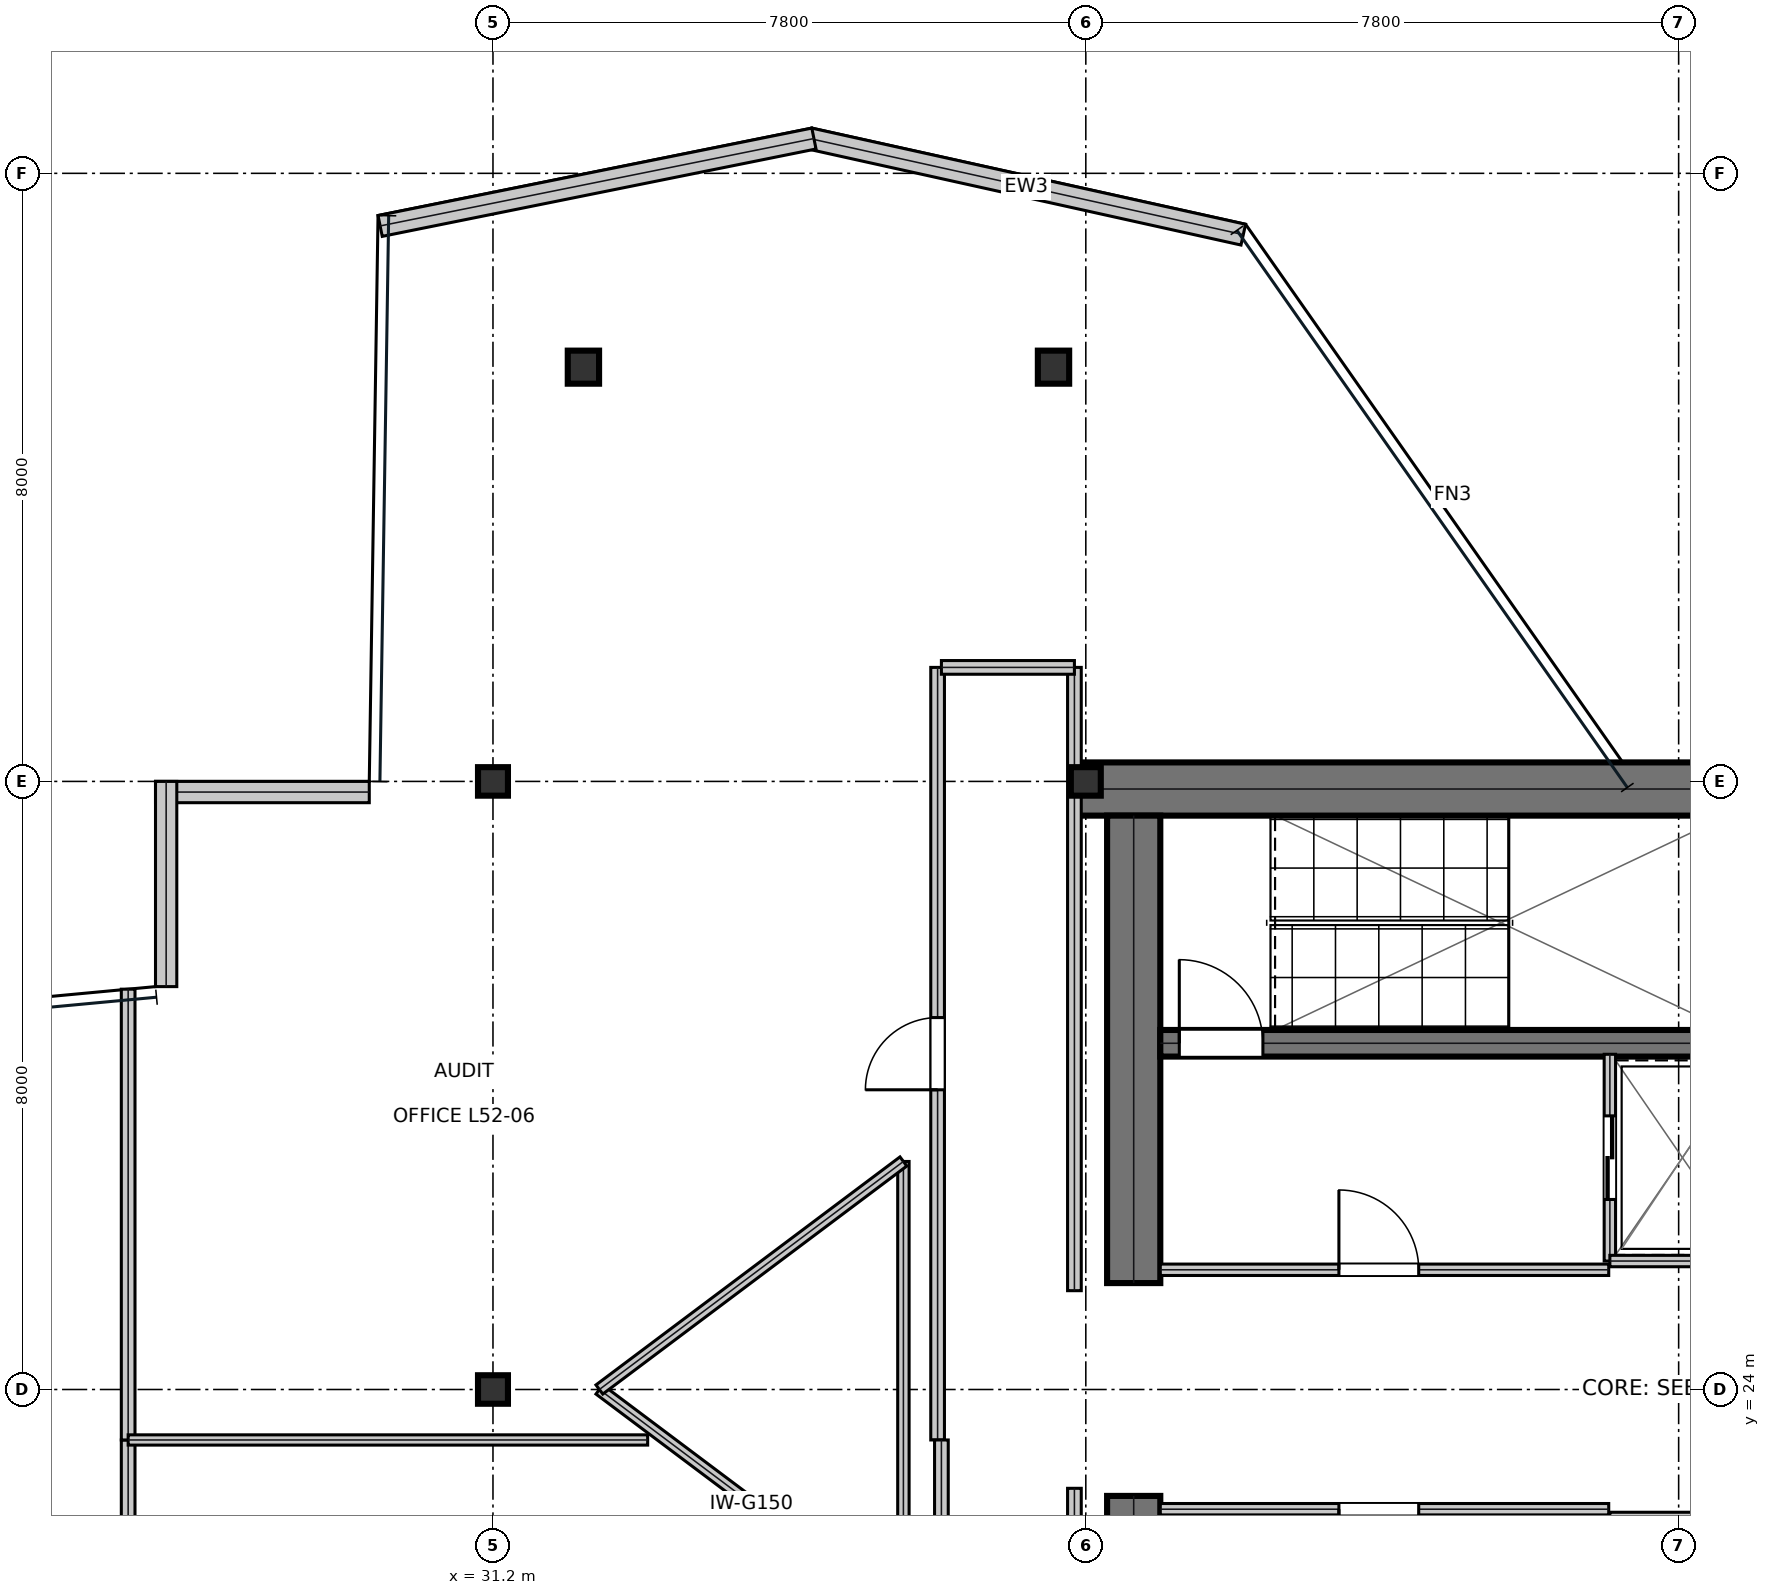
"""IFC4 building model, lengths in metres.
Left out: names, types, materials, properties, quantities, classifications, styles, units other than length and angle.
Written with IfcOpenShell. Run it as: python <this file> out.ifc"""

import sys

from ifc_helpers import new_model, si_unit, direction, frame, frame_2d, origin, origin_2d, place, context, subcontext, project, spatial, rectangle, i_section, extrude, element, fill, save


model = new_model("IFC4")
c1 = context("Model", 3, precision=1e-05, world=origin(), true_north=direction((0.0, 1.0)))
c2 = subcontext(c1, "Body", "Model", "MODEL_VIEW")
j1 = project(units=[si_unit("LENGTHUNIT", "METRE"), si_unit("PLANEANGLEUNIT", "RADIAN")], contexts=[c1])
p1 = place(None, origin())
s1 = spatial("IfcSite", under=j1, at=p1, CompositionType="ELEMENT")
p2 = place(p1, origin())
s2 = spatial("IfcBuilding", under=s1, at=p2, CompositionType="ELEMENT")
p3 = place(p2, frame((0.0, 0.0, 224.25)))
s3 = spatial("IfcBuildingStorey", under=s2, at=p3, CompositionType="ELEMENT", Elevation=224.25)
p4 = place(p3, frame((38.8, 31.9, 0.0), z_axis=(0.0, 0.0, 1.0), x_axis=(1.0, 0.0, 0.0)))
e1 = element("IfcWall", 1, at=p4, inside=s3, PredefinedType="SHEAR", context=c2, shape_type="SweptSolid", body=[
    extrude(rectangle(XDim=16.0, YDim=0.7, at=frame_2d((8.0, 0.0))), origin(), (0.0, 0.0, 1.0), 3.79),
])
for number, where, z_axis, x_axis in (
    (2, (39.63, 16.45, 0.0), (0.0, 0.0, 1.0), (0.0, 1.0, 0.0)),
    (3, (39.63, 25.4, 0.0), (0.0, 0.0, 1.0), (0.0, 1.0, 0.0)),
):
    element("IfcWall", number, at=place(p3, frame(where, z_axis=z_axis, x_axis=x_axis)), inside=s3, PredefinedType="SHEAR", context=c2, shape_type="SweptSolid", body=[
        extrude(rectangle(XDim=6.15, YDim=0.7, at=frame_2d((3.075, 0.0))), origin(), (0.0, 0.0, 1.0), 3.79),
    ])
p5 = place(p3, frame((39.98, 28.555, 0.0), z_axis=(0.0, 0.0, 1.0), x_axis=(1.0, 0.0, 0.0)))
e4 = element("IfcWall", 4, at=p5, inside=s3, PredefinedType="SHEAR", context=c2, shape_type="SweptSolid", body=[
    extrude(rectangle(XDim=7.71, YDim=0.35, at=frame_2d((3.855, 0.0))), origin(), (0.0, 0.0, 1.0), 3.79),
])
p6 = place(p5, frame((0.25, 0.0, 0.0)))
e5 = element("IfcOpeningElement", 5, at=p6, cuts=e4, PredefinedType="OPENING", context=c2, shape_type="SweptSolid", body=[
    extrude(rectangle(XDim=1.1, YDim=2.15, at=frame_2d((0.55, 1.075))), frame((0.0, 0.185, 0.0), z_axis=(0.0, -1.0, 0.0), x_axis=(1.0, 0.0, 0.0)), (0.0, 0.0, 1.0), 0.37),
])
for number, where, z_axis, x_axis in (
    (6, (31.2, 24.0, 0.0), (0.0, 0.0, 1.0), (1.0, 0.0, 0.0)),
    (7, (31.2, 32.0, 0.0), (0.0, 0.0, 1.0), (1.0, 0.0, 0.0)),
    (8, (39.0, 32.0, 0.0), (0.0, 0.0, 1.0), (1.0, 0.0, 0.0)),
):
    element("IfcColumn", number, at=place(p3, frame(where, z_axis=z_axis, x_axis=x_axis)), inside=s3, PredefinedType="COLUMN", context=c2, shape_type="SweptSolid", body=[
        extrude(i_section(OverallWidth=0.394, OverallDepth=0.375, WebThickness=0.017, FlangeThickness=0.028, at=origin_2d()), origin(), (0.0, 0.0, 1.0), 4.044),
    ])
p7 = place(p3, frame((32.39, 37.45, 0.016), z_axis=(0.013968236766, -0.029819148922, 0.999457706318), x_axis=(0.905569653976, 0.424197597586, 0.0)))
e9 = element("IfcColumn", 9, at=p7, inside=s3, PredefinedType="COLUMN", context=c2, shape_type="SweptSolid", body=[
    extrude(i_section(OverallWidth=0.412, OverallDepth=0.435, WebThickness=0.036, FlangeThickness=0.058, at=origin_2d()), origin(), (0.0, 0.0, 1.0), 4.02),
])
p8 = place(p3, frame((38.575, 37.45, 0.016), z_axis=(-0.004980404192, -0.029821688517, 0.99954282673), x_axis=(0.986339577116, -0.164724735893, 0.0)))
e10 = element("IfcColumn", 10, at=p8, inside=s3, PredefinedType="COLUMN", context=c2, shape_type="SweptSolid", body=[
    extrude(i_section(OverallWidth=0.412, OverallDepth=0.435, WebThickness=0.036, FlangeThickness=0.058, at=origin_2d()), origin(), (0.0, 0.0, 1.0), 4.02),
])
p9 = place(p3, frame((41.072, 39.193, 0.0), z_axis=(0.0, 0.0, 1.0), x_axis=(-0.976309738065, 0.216377668346, 0.0)))
e11 = element("IfcWall", 11, at=p9, inside=s3, PredefinedType="STANDARD", context=c2, shape_type="SweptSolid", body=[
    extrude(rectangle(XDim=5.846, YDim=0.28, at=frame_2d((2.923, 0.0))), origin(), (0.0, 0.0, 1.0), 3.79),
])
p10 = place(p3, frame((35.423, 40.458, 0.0), z_axis=(0.0, 0.0, 1.0), x_axis=(-0.98030065813, -0.197511062146, 0.0)))
e12 = element("IfcWall", 12, at=p10, inside=s3, PredefinedType="STANDARD", context=c2, shape_type="SweptSolid", body=[
    extrude(rectangle(XDim=5.822, YDim=0.28, at=frame_2d((2.911, 0.0))), origin(), (0.0, 0.0, 1.0), 3.79),
])
p11 = place(p3, frame((29.573, 31.86, 0.0), z_axis=(0.0, 0.0, 1.0), x_axis=(-1.0, 0.0, 0.0)))
e13 = element("IfcWall", 13, at=p11, inside=s3, PredefinedType="STANDARD", context=c2, shape_type="SweptSolid", body=[
    extrude(rectangle(XDim=2.812, YDim=0.28, at=frame_2d((1.406, 0.0))), origin(), (0.0, 0.0, 1.0), 3.79),
])
p12 = place(p3, frame((26.9, 32.0, 0.0), z_axis=(0.0, 0.0, 1.0), x_axis=(0.0, -1.0, 0.0)))
e14 = element("IfcWall", 14, at=p12, inside=s3, PredefinedType="STANDARD", context=c2, shape_type="SweptSolid", body=[
    extrude(rectangle(XDim=2.7, YDim=0.28, at=frame_2d((1.35, 0.0))), origin(), (0.0, 0.0, 1.0), 3.319),
])
p13 = place(p3, frame((39.98, 25.575, 0.0), z_axis=(0.0, 0.0, 1.0), x_axis=(1.0, 0.0, 0.0)))
e15 = element("IfcWall", 15, at=p13, inside=s3, PredefinedType="PARTITIONING", context=c2, shape_type="SweptSolid", body=[
    extrude(rectangle(XDim=5.9, YDim=0.15, at=frame_2d((2.95, 0.0))), origin(), (0.0, 0.0, 1.0), 3.79),
])
p14 = place(p13, frame((2.35, 0.0, 0.0)))
e16 = element("IfcOpeningElement", 16, at=p14, cuts=e15, PredefinedType="OPENING", context=c2, shape_type="SweptSolid", body=[
    extrude(rectangle(XDim=1.05, YDim=2.15, at=frame_2d((0.525, 1.075))), frame((0.0, 0.085, 0.0), z_axis=(0.0, -1.0, 0.0), x_axis=(1.0, 0.0, 0.0)), (0.0, 0.0, 1.0), 0.17),
])
p15 = place(p3, frame((39.98, 22.425, 0.0), z_axis=(0.0, 0.0, 1.0), x_axis=(1.0, 0.0, 0.0)))
e17 = element("IfcWall", 17, at=p15, inside=s3, PredefinedType="PARTITIONING", context=c2, shape_type="SweptSolid", body=[
    extrude(rectangle(XDim=5.9, YDim=0.15, at=frame_2d((2.95, 0.0))), origin(), (0.0, 0.0, 1.0), 3.79),
])
p16 = place(p15, frame((2.35, 0.0, 0.0)))
e18 = element("IfcOpeningElement", 18, at=p16, cuts=e17, PredefinedType="OPENING", context=c2, shape_type="SweptSolid", body=[
    extrude(rectangle(XDim=1.05, YDim=2.15, at=frame_2d((0.525, 1.075))), frame((0.0, 0.085, 0.0), z_axis=(0.0, -1.0, 0.0), x_axis=(1.0, 0.0, 0.0)), (0.0, 0.0, 1.0), 0.17),
])
p17 = place(p3, frame((45.895, 25.69, 0.0), z_axis=(0.0, 0.0, 1.0), x_axis=(0.0, 1.0, 0.0)))
e19 = element("IfcWall", 19, at=p17, inside=s3, PredefinedType="PARTITIONING", context=c2, shape_type="SweptSolid", body=[
    extrude(rectangle(XDim=2.72, YDim=0.15, at=frame_2d((1.36, 0.0))), origin(), (0.0, 0.0, 1.0), 3.79),
])
p18 = place(p17, frame((0.81, 0.0, 0.0)))
e20 = element("IfcOpeningElement", 20, at=p18, cuts=e19, PredefinedType="OPENING", context=c2, shape_type="SweptSolid", body=[
    extrude(rectangle(XDim=1.1, YDim=2.15, at=frame_2d((0.55, 1.075))), frame((0.0, 0.085, 0.0), z_axis=(0.0, -1.0, 0.0), x_axis=(1.0, 0.0, 0.0)), (0.0, 0.0, 1.0), 0.17),
])
for number, where, z_axis, x_axis in (
    (21, (45.895, 25.69, 0.0), (0.0, 0.0, 1.0), (1.0, 0.0, 0.0)),
    (22, (45.895, 22.31, 0.0), (0.0, 0.0, 1.0), (1.0, 0.0, 0.0)),
):
    element("IfcWall", number, at=place(p3, frame(where, z_axis=z_axis, x_axis=x_axis)), inside=s3, PredefinedType="PARTITIONING", context=c2, shape_type="SweptSolid", body=[
        extrude(rectangle(XDim=1.915, YDim=0.15, at=frame_2d((0.958, 0.0))), origin(), (0.0, 0.0, 1.0), 3.79),
    ])
p19 = place(p3, frame((37.05, 23.336, 0.0), z_axis=(0.0, 0.0, 1.0), x_axis=(0.0, 1.0, 0.0)))
e23 = element("IfcWall", 23, at=p19, inside=s3, PredefinedType="SOLIDWALL", context=c2, shape_type="SweptSolid", body=[
    extrude(rectangle(XDim=10.164, YDim=0.18, at=frame_2d((5.082, 0.0))), origin(), (0.0, 0.0, 1.0), 3.241),
])
p20 = place(p19, frame((4.607, 0.0, 0.0)))
e24 = element("IfcOpeningElement", 24, at=p20, cuts=e23, PredefinedType="OPENING", context=c2, shape_type="SweptSolid", body=[
    extrude(rectangle(XDim=0.95, YDim=2.15, at=frame_2d((0.475, 1.075))), frame((0.0, 0.1, 0.0), z_axis=(0.0, -1.0, 0.0), x_axis=(1.0, 0.0, 0.0)), (0.0, 0.0, 1.0), 0.2),
])
p21 = place(p3, frame((38.85, 14.707, 0.0), z_axis=(0.0, 0.0, 1.0), x_axis=(0.0, 1.0, 0.0)))
e25 = element("IfcWall", 25, at=p21, inside=s3, PredefinedType="SOLIDWALL", context=c2, shape_type="SweptSolid", body=[
    extrude(rectangle(XDim=7.993, YDim=0.18, at=frame_2d((3.997, 0.0))), origin(), (0.0, 0.0, 1.0), 3.241),
])
p22 = place(p3, frame((26.4, 20.6, 0.0), z_axis=(0.0, 0.0, 1.0), x_axis=(0.0, 1.0, 0.0)))
e26 = element("IfcWall", 26, at=p22, inside=s3, PredefinedType="SOLIDWALL", context=c2, shape_type="SweptSolid", body=[
    extrude(rectangle(XDim=2.736, YDim=0.18, at=frame_2d((1.368, 0.0))), origin(), (0.0, 0.0, 1.0), 3.241),
])
p23 = place(p3, frame((37.1, 20.6, 0.0), z_axis=(0.0, 0.0, 1.0), x_axis=(0.0, 1.0, 0.0)))
e27 = element("IfcWall", 27, at=p23, inside=s3, PredefinedType="SOLIDWALL", context=c2, shape_type="SweptSolid", body=[
    extrude(rectangle(XDim=2.736, YDim=0.18, at=frame_2d((1.368, 0.0))), origin(), (0.0, 0.0, 1.0), 3.79),
])
p24 = place(p3, frame((38.85, 25.3, 0.0), z_axis=(0.0, 0.0, 1.0), x_axis=(0.0, 1.0, 0.0)))
e28 = element("IfcWall", 28, at=p24, inside=s3, PredefinedType="SOLIDWALL", context=c2, shape_type="SweptSolid", body=[
    extrude(rectangle(XDim=8.2, YDim=0.18, at=frame_2d((4.1, 0.0))), origin(), (0.0, 0.0, 1.0), 3.241),
])
p25 = place(p3, frame((26.4, 23.336, 0.0), z_axis=(0.0, 0.0, 1.0), x_axis=(0.0, 1.0, 0.0)))
e29 = element("IfcWall", 29, at=p25, inside=s3, PredefinedType="SOLIDWALL", context=c2, shape_type="SweptSolid", body=[
    extrude(rectangle(XDim=5.931, YDim=0.18, at=frame_2d((2.965, 0.0))), origin(), (0.0, 0.0, 1.0), 3.241),
])
p26 = place(p3, frame((37.1, 33.5, 0.0), z_axis=(0.0, 0.0, 1.0), x_axis=(1.0, 0.0, 0.0)))
e30 = element("IfcWall", 30, at=p26, inside=s3, PredefinedType="SOLIDWALL", context=c2, shape_type="SweptSolid", body=[
    extrude(rectangle(XDim=1.75, YDim=0.18, at=frame_2d((0.875, 0.0))), origin(), (0.0, 0.0, 1.0), 3.241),
])
p27 = place(p3, frame((26.4, 23.336, 0.0), z_axis=(0.0, 0.0, 1.0), x_axis=(1.0, 0.0, 0.0)))
e31 = element("IfcWall", 31, at=p27, inside=s3, PredefinedType="PARTITIONING", context=c2, shape_type="SweptSolid", body=[
    extrude(rectangle(XDim=6.835, YDim=0.135, at=frame_2d((3.418, 0.0))), origin(), (0.0, 0.0, 1.0), 3.241),
])
p28 = place(p3, frame((32.6, 24.0, 0.0), z_axis=(0.0, 0.0, 1.0), x_axis=(0.8, -0.6, 0.0)))
e32 = element("IfcWall", 32, at=p28, inside=s3, PredefinedType="MOVABLE", context=c2, shape_type="SweptSolid", body=[
    extrude(rectangle(XDim=5.0, YDim=0.15, at=frame_2d((2.5, 0.0))), origin(), (0.0, 0.0, 1.0), 3.79),
])
p29 = place(p3, frame((36.6, 21.0, 0.0), z_axis=(0.0, 0.0, 1.0), x_axis=(0.0, 1.0, 0.0)))
e33 = element("IfcWall", 33, at=p29, inside=s3, PredefinedType="MOVABLE", context=c2, shape_type="SweptSolid", body=[
    extrude(rectangle(XDim=6.0, YDim=0.15, at=frame_2d((3.0, 0.0))), origin(), (0.0, 0.0, 1.0), 3.79),
])
p30 = place(p3, frame((36.6, 27.0, 0.0), z_axis=(0.0, 0.0, 1.0), x_axis=(-0.8, -0.6, 0.0)))
e34 = element("IfcWall", 34, at=p30, inside=s3, PredefinedType="MOVABLE", context=c2, shape_type="SweptSolid", body=[
    extrude(rectangle(XDim=5.0, YDim=0.15, at=frame_2d((2.5, 0.0))), origin(), (0.0, 0.0, 1.0), 3.79),
])
p31 = place(p14, origin())
e35 = element("IfcDoor", 35, at=p31, inside=s3, OperationType="SINGLE_SWING_LEFT", PredefinedType="DOOR", context=c2, shape_type="SweptSolid", body=[
    extrude(rectangle(XDim=1.05, YDim=2.15, at=frame_2d((0.525, 1.075))), frame((0.0, 0.025, 0.0), z_axis=(0.0, -1.0, 0.0), x_axis=(1.0, 0.0, 0.0)), (0.0, 0.0, 1.0), 0.05),
])
fill(e16, e35)
p32 = place(p16, frame((1.05, 0.0, 0.0), z_axis=(0.0, 0.0, 1.0), x_axis=(-1.0, 0.0, 0.0)))
e36 = element("IfcDoor", 36, at=p32, inside=s3, OperationType="SINGLE_SWING_RIGHT", PredefinedType="DOOR", context=c2, shape_type="SweptSolid", body=[
    extrude(rectangle(XDim=1.05, YDim=2.15, at=frame_2d((0.525, 1.075))), frame((0.0, 0.025, 0.0), z_axis=(0.0, -1.0, 0.0), x_axis=(1.0, 0.0, 0.0)), (0.0, 0.0, 1.0), 0.05),
])
fill(e18, e36)
p33 = place(p18, frame((1.1, 0.0, 0.0), z_axis=(0.0, 0.0, 1.0), x_axis=(-1.0, 0.0, 0.0)))
e37 = element("IfcDoor", 37, at=p33, inside=s3, OperationType="DOUBLE_DOOR_SLIDING", PredefinedType="DOOR", context=c2, shape_type="SweptSolid", body=[
    extrude(rectangle(XDim=1.1, YDim=2.15, at=frame_2d((0.55, 1.075))), frame((0.0, 0.025, 0.0), z_axis=(0.0, -1.0, 0.0), x_axis=(1.0, 0.0, 0.0)), (0.0, 0.0, 1.0), 0.05),
])
fill(e20, e37)
p34 = place(p20, origin())
e38 = element("IfcDoor", 38, at=p34, inside=s3, OperationType="SINGLE_SWING_LEFT", PredefinedType="DOOR", context=c2, shape_type="SweptSolid", body=[
    extrude(rectangle(XDim=0.95, YDim=2.15, at=frame_2d((0.475, 1.075))), frame((0.0, 0.025, 0.0), z_axis=(0.0, -1.0, 0.0), x_axis=(1.0, 0.0, 0.0)), (0.0, 0.0, 1.0), 0.05),
])
fill(e24, e38)
p35 = place(p6, origin())
e39 = element("IfcDoor", 39, at=p35, inside=s3, OperationType="SINGLE_SWING_LEFT", PredefinedType="DOOR", context=c2, shape_type="SweptSolid", body=[
    extrude(rectangle(XDim=1.1, YDim=2.15, at=frame_2d((0.55, 1.075))), frame((0.0, 0.025, 0.0), z_axis=(0.0, -1.0, 0.0), x_axis=(1.0, 0.0, 0.0)), (0.0, 0.0, 1.0), 0.05),
])
fill(e5, e39)
save(model, sys.argv[1])
